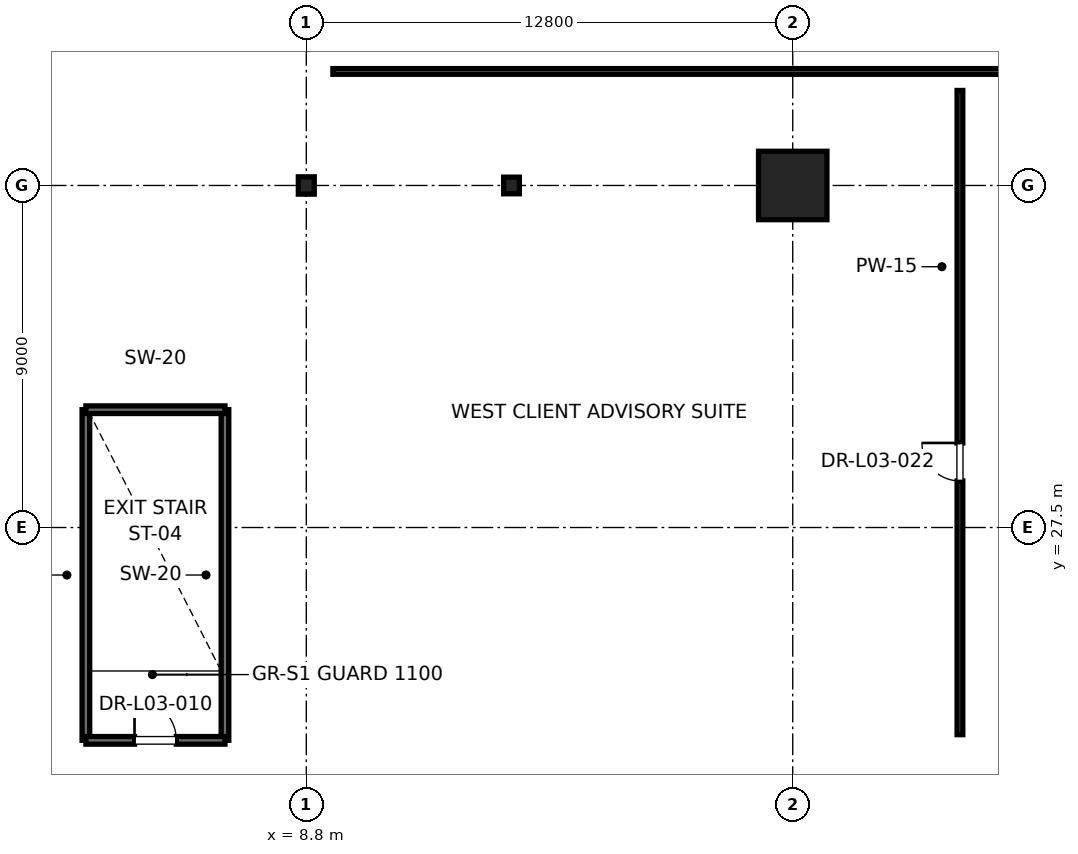
"""IFC4 building model, lengths in metres.
Left out: names, types, materials, properties, quantities, classifications, styles, units other than length and angle.
Written with IfcOpenShell. Run it as: python <this file> out.ifc"""

import sys

from ifc_helpers import new_model, si_unit, direction, frame, frame_2d, origin, origin_2d, place, context, subcontext, project, spatial, rectangle, i_section, extrude, element, fill, save


model = new_model("IFC4")
c1 = context("Model", 3, precision=1e-05, world=origin(), true_north=direction((0.0, 1.0)))
c2 = subcontext(c1, "Body", "Model", "MODEL_VIEW")
j1 = project(units=[si_unit("LENGTHUNIT", "METRE"), si_unit("PLANEANGLEUNIT", "RADIAN")], contexts=[c1])
p1 = place(None, origin())
s1 = spatial("IfcSite", under=j1, at=p1, CompositionType="ELEMENT")
p2 = place(p1, origin())
s2 = spatial("IfcBuilding", under=s1, at=p2, CompositionType="ELEMENT")
p3 = place(p2, frame((0.0, 0.0, 16.4)))
s3 = spatial("IfcBuildingStorey", under=s2, at=p3, CompositionType="ELEMENT", Elevation=16.4)
p4 = place(p3, frame((21.6, 36.5, 0.0), z_axis=(0.0, 0.0, 1.0), x_axis=(1.0, 0.0, 0.0)))
e1 = element("IfcColumn", 1, at=p4, inside=s3, PredefinedType="COLUMN", context=c2, shape_type="SweptSolid", body=[
    extrude(rectangle(XDim=1.8, YDim=1.8, at=origin_2d()), origin(), (0.0, 0.0, 1.0), 5.2),
])
p5 = place(p3, frame((14.2, 36.5, 0.0), z_axis=(0.0, 0.0, 1.0), x_axis=(1.0, 0.0, 0.0)))
e2 = element("IfcColumn", 2, at=p5, inside=s3, PredefinedType="COLUMN", context=c2, shape_type="SweptSolid", body=[
    extrude(i_section(OverallWidth=0.412, OverallDepth=0.437, WebThickness=0.036, FlangeThickness=0.058, FilletRadius=0.015, at=origin_2d()), origin(), (0.0, 0.0, 1.0), 5.2),
])
p6 = place(p3, frame((8.8, 36.5, 0.0), z_axis=(0.0, 0.0, 1.0), x_axis=(1.0, 0.0, 0.0)))
e3 = element("IfcColumn", 3, at=p6, inside=s3, PredefinedType="COLUMN", context=c2, shape_type="SweptSolid", body=[
    extrude(i_section(OverallWidth=0.418, OverallDepth=0.456, WebThickness=0.042, FlangeThickness=0.067, FilletRadius=0.015, at=origin_2d()), origin(), (0.0, 0.0, 1.0), 5.2),
])
for number, where, z_axis, x_axis in (
    (4, (3.0, 21.9, 0.0), (0.0, 0.0, 1.0), (0.0, 1.0, 0.0)),
    (5, (6.66, 21.9, 0.0), (0.0, 0.0, 1.0), (0.0, 1.0, 0.0)),
):
    element("IfcWall", number, at=place(p3, frame(where, z_axis=z_axis, x_axis=x_axis)), inside=s3, PredefinedType="SOLIDWALL", context=c2, shape_type="SweptSolid", body=[
        extrude(rectangle(XDim=8.7, YDim=0.2, at=frame_2d((4.35, 0.0))), origin(), (0.0, 0.0, 1.0), 4.9),
    ])
p7 = place(p3, frame((3.0, 30.6, 0.0), z_axis=(0.0, 0.0, 1.0), x_axis=(1.0, 0.0, 0.0)))
e6 = element("IfcWall", 6, at=p7, inside=s3, PredefinedType="SOLIDWALL", context=c2, shape_type="SweptSolid", body=[
    extrude(rectangle(XDim=3.66, YDim=0.2, at=frame_2d((1.83, 0.0))), origin(), (0.0, 0.0, 1.0), 4.9),
])
p8 = place(p3, frame((3.0, 21.9, 0.0), z_axis=(0.0, 0.0, 1.0), x_axis=(1.0, 0.0, 0.0)))
e7 = element("IfcWall", 7, at=p8, inside=s3, PredefinedType="SOLIDWALL", context=c2, shape_type="SweptSolid", body=[
    extrude(rectangle(XDim=3.66, YDim=0.2, at=frame_2d((1.83, 0.0))), origin(), (0.0, 0.0, 1.0), 4.9),
])
p9 = place(p8, frame((1.28, 0.0, 0.0)))
e8 = element("IfcOpeningElement", 8, at=p9, cuts=e7, PredefinedType="OPENING", context=c2, shape_type="SweptSolid", body=[
    extrude(rectangle(XDim=1.1, YDim=2.15, at=frame_2d((0.55, 1.075))), frame((0.0, 0.1, 0.0), z_axis=(0.0, -1.0, 0.0), x_axis=(1.0, 0.0, 0.0)), (0.0, 0.0, 1.0), 0.2),
])
p10 = place(p3, frame((9.5, 39.5, 0.0), z_axis=(0.0, 0.0, 1.0), x_axis=(1.0, 0.0, 0.0)))
e9 = element("IfcWall", 9, at=p10, inside=s3, PredefinedType="PARTITIONING", context=c2, shape_type="SweptSolid", body=[
    extrude(rectangle(XDim=37.75, YDim=0.15, at=frame_2d((18.875, 0.0))), origin(), (0.0, 0.0, 1.0), 2.85),
])
p11 = place(p10, frame((18.34, 0.0, 0.0)))
e10 = element("IfcOpeningElement", 10, at=p11, cuts=e9, PredefinedType="OPENING", context=c2, shape_type="SweptSolid", body=[
    extrude(rectangle(XDim=1.0, YDim=2.15, at=frame_2d((0.5, 1.075))), frame((0.0, 0.075, 0.0), z_axis=(0.0, -1.0, 0.0), x_axis=(1.0, 0.0, 0.0)), (0.0, 0.0, 1.0), 0.15),
])
p12 = place(p3, frame((26.0, 22.05, 0.0), z_axis=(0.0, 0.0, 1.0), x_axis=(0.0, 1.0, 0.0)))
e11 = element("IfcWall", 11, at=p12, inside=s3, PredefinedType="PARTITIONING", context=c2, shape_type="SweptSolid", body=[
    extrude(rectangle(XDim=16.95, YDim=0.15, at=frame_2d((8.475, 0.0))), origin(), (0.0, 0.0, 1.0), 2.85),
])
p13 = place(p12, frame((6.675, 0.0, 0.0)))
e12 = element("IfcOpeningElement", 12, at=p13, cuts=e11, PredefinedType="OPENING", context=c2, shape_type="SweptSolid", body=[
    extrude(rectangle(XDim=1.0, YDim=2.15, at=frame_2d((0.5, 1.075))), frame((0.0, 0.075, 0.0), z_axis=(0.0, -1.0, 0.0), x_axis=(1.0, 0.0, 0.0)), (0.0, 0.0, 1.0), 0.15),
])
p14 = place(p9, origin())
e13 = element("IfcDoor", 13, at=p14, inside=s3, OperationType="SINGLE_SWING_LEFT", PredefinedType="DOOR", context=c2, shape_type="SweptSolid", body=[
    extrude(rectangle(XDim=1.1, YDim=2.15, at=frame_2d((0.55, 1.075))), frame((0.0, 0.025, 0.0), z_axis=(0.0, -1.0, 0.0), x_axis=(1.0, 0.0, 0.0)), (0.0, 0.0, 1.0), 0.05),
])
fill(e8, e13)
p15 = place(p13, origin())
e14 = element("IfcDoor", 14, at=p15, inside=s3, OperationType="SINGLE_SWING_RIGHT", PredefinedType="DOOR", context=c2, shape_type="SweptSolid", body=[
    extrude(rectangle(XDim=1.0, YDim=2.15, at=frame_2d((0.5, 1.075))), frame((0.0, 0.025, 0.0), z_axis=(0.0, -1.0, 0.0), x_axis=(1.0, 0.0, 0.0)), (0.0, 0.0, 1.0), 0.05),
])
fill(e12, e14)
save(model, sys.argv[1])
